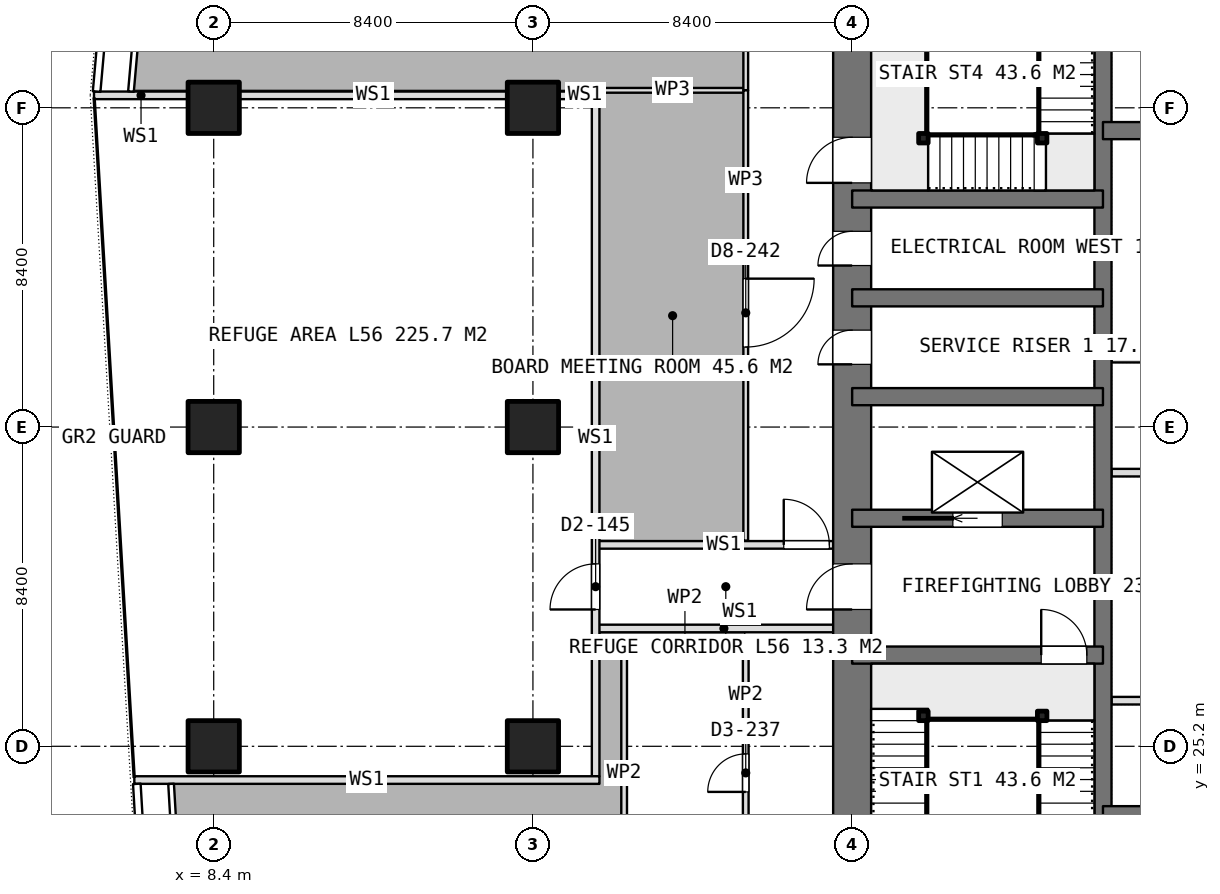
"""IFC4 building model, lengths in metres.
Left out: names, types, materials, properties, quantities, classifications, styles, units other than length and angle.
Written with IfcOpenShell. Run it as: python <this file> out.ifc"""

import sys

from ifc_helpers import new_model, si_unit, direction, frame, frame_2d, origin, origin_2d, place, context, subcontext, project, spatial, rectangle, extrude, element, fill, save


model = new_model("IFC4")
c1 = context("Model", 3, precision=1e-05, world=origin(), true_north=direction((0.0, 1.0)))
c2 = subcontext(c1, "Body", "Model", "MODEL_VIEW")
j1 = project(units=[si_unit("LENGTHUNIT", "METRE"), si_unit("PLANEANGLEUNIT", "RADIAN")], contexts=[c1])
p1 = place(None, origin())
s1 = spatial("IfcSite", under=j1, at=p1, CompositionType="ELEMENT")
p2 = place(p1, origin())
s2 = spatial("IfcBuilding", under=s1, at=p2, CompositionType="ELEMENT")
p3 = place(p2, frame((0.0, 0.0, 221.45)))
s3 = spatial("IfcBuildingStorey", under=s2, at=p3, CompositionType="ELEMENT", Elevation=221.45)
p4 = place(p3, frame((25.2, 21.0, 0.0), z_axis=(0.0, 0.0, 1.0), x_axis=(0.0, 1.0, 0.0)))
e1 = element("IfcWall", 1, at=p4, inside=s3, PredefinedType="SHEAR", context=c2, shape_type="SweptSolid", body=[
    extrude(rectangle(XDim=25.2, YDim=1.0, at=frame_2d((12.6, 0.0))), origin(), (0.0, 0.0, 1.0), 3.75),
])
p5 = place(p4, frame((7.8, 0.0, 0.0)))
e2 = element("IfcOpeningElement", 2, at=p5, cuts=e1, PredefinedType="OPENING", context=c2, shape_type="SweptSolid", body=[
    extrude(rectangle(XDim=1.2, YDim=2.1, at=frame_2d((0.6, 1.05))), frame((0.0, 0.51, 0.0), z_axis=(0.0, -1.0, 0.0), x_axis=(1.0, 0.0, 0.0)), (0.0, 0.0, 1.0), 1.02),
])
p6 = place(p4, frame((14.25, 0.0, 0.0)))
e3 = element("IfcOpeningElement", 3, at=p6, cuts=e1, PredefinedType="OPENING", context=c2, shape_type="SweptSolid", body=[
    extrude(rectangle(XDim=0.9, YDim=2.1, at=frame_2d((0.45, 1.05))), frame((0.0, 0.51, 0.0), z_axis=(0.0, -1.0, 0.0), x_axis=(1.0, 0.0, 0.0)), (0.0, 0.0, 1.0), 1.02),
])
p7 = place(p4, frame((16.85, 0.0, 0.0)))
e4 = element("IfcOpeningElement", 4, at=p7, cuts=e1, PredefinedType="OPENING", context=c2, shape_type="SweptSolid", body=[
    extrude(rectangle(XDim=0.9, YDim=2.1, at=frame_2d((0.45, 1.05))), frame((0.0, 0.51, 0.0), z_axis=(0.0, -1.0, 0.0), x_axis=(1.0, 0.0, 0.0)), (0.0, 0.0, 1.0), 1.02),
])
p8 = place(p4, frame((19.025, 0.0, 0.0)))
e5 = element("IfcOpeningElement", 5, at=p8, cuts=e1, PredefinedType="OPENING", context=c2, shape_type="SweptSolid", body=[
    extrude(rectangle(XDim=1.2, YDim=2.1, at=frame_2d((0.6, 1.05))), frame((0.0, 0.51, 0.0), z_axis=(0.0, -1.0, 0.0), x_axis=(1.0, 0.0, 0.0)), (0.0, 0.0, 1.0), 1.02),
])
p9 = place(p3, frame((31.8, 21.0, 0.0), z_axis=(0.0, 0.0, 1.0), x_axis=(0.0, 1.0, 0.0)))
e6 = element("IfcWall", 6, at=p9, inside=s3, PredefinedType="SHEAR", context=c2, shape_type="SweptSolid", body=[
    extrude(rectangle(XDim=25.2, YDim=0.45, at=frame_2d((12.6, 0.0))), origin(), (0.0, 0.0, 1.0), 3.75),
])
for number, where, z_axis, x_axis in (
    (7, (31.8, 23.4, 0.0), (0.0, 0.0, 1.0), (1.0, 0.0, 0.0)),
    (8, (31.8, 41.4, 0.0), (0.0, 0.0, 1.0), (1.0, 0.0, 0.0)),
):
    element("IfcWall", number, at=place(p3, frame(where, z_axis=z_axis, x_axis=x_axis)), inside=s3, PredefinedType="SHEAR", context=c2, shape_type="SweptSolid", body=[
        extrude(rectangle(XDim=3.8, YDim=0.45, at=frame_2d((1.9, 0.0))), origin(), (0.0, 0.0, 1.0), 3.75),
    ])
p10 = place(p3, frame((25.2, 27.6, 0.0), z_axis=(0.0, 0.0, 1.0), x_axis=(1.0, 0.0, 0.0)))
e9 = element("IfcWall", 9, at=p10, inside=s3, PredefinedType="SHEAR", context=c2, shape_type="SweptSolid", body=[
    extrude(rectangle(XDim=6.6, YDim=0.45, at=frame_2d((3.3, 0.0))), origin(), (0.0, 0.0, 1.0), 3.75),
])
p11 = place(p10, frame((4.975, 0.0, 0.0)))
e10 = element("IfcOpeningElement", 10, at=p11, cuts=e9, PredefinedType="OPENING", context=c2, shape_type="SweptSolid", body=[
    extrude(rectangle(XDim=1.2, YDim=2.1, at=frame_2d((0.6, 1.05))), frame((0.0, 0.235, 0.0), z_axis=(0.0, -1.0, 0.0), x_axis=(1.0, 0.0, 0.0)), (0.0, 0.0, 1.0), 0.47),
])
p12 = place(p3, frame((25.2, 31.2, 0.0), z_axis=(0.0, 0.0, 1.0), x_axis=(1.0, 0.0, 0.0)))
e11 = element("IfcWall", 11, at=p12, inside=s3, PredefinedType="SHEAR", context=c2, shape_type="SweptSolid", body=[
    extrude(rectangle(XDim=6.6, YDim=0.45, at=frame_2d((3.3, 0.0))), origin(), (0.0, 0.0, 1.0), 3.75),
])
p13 = place(p12, frame((2.65, 0.0, 0.0)))
e12 = element("IfcOpeningElement", 12, at=p13, cuts=e11, PredefinedType="OPENING", context=c2, shape_type="SweptSolid", body=[
    extrude(rectangle(XDim=1.3, YDim=2.1, at=frame_2d((0.65, 1.05))), frame((0.0, 0.235, 0.0), z_axis=(0.0, -1.0, 0.0), x_axis=(1.0, 0.0, 0.0)), (0.0, 0.0, 1.0), 0.47),
])
for number, where, z_axis, x_axis in (
    (13, (25.2, 34.4, 0.0), (0.0, 0.0, 1.0), (1.0, 0.0, 0.0)),
    (14, (25.2, 37.0, 0.0), (0.0, 0.0, 1.0), (1.0, 0.0, 0.0)),
    (15, (25.2, 39.6, 0.0), (0.0, 0.0, 1.0), (1.0, 0.0, 0.0)),
):
    element("IfcWall", number, at=place(p3, frame(where, z_axis=z_axis, x_axis=x_axis)), inside=s3, PredefinedType="SHEAR", context=c2, shape_type="SweptSolid", body=[
        extrude(rectangle(XDim=6.6, YDim=0.45, at=frame_2d((3.3, 0.0))), origin(), (0.0, 0.0, 1.0), 3.75),
    ])
for number, where, z_axis, x_axis in (
    (16, (8.4, 25.2, 0.0), (0.0, 0.0, 1.0), (1.0, 0.0, 0.0)),
    (17, (8.4, 33.6, 0.0), (0.0, 0.0, 1.0), (1.0, 0.0, 0.0)),
    (18, (8.4, 42.0, 0.0), (0.0, 0.0, 1.0), (1.0, 0.0, 0.0)),
    (19, (16.8, 25.2, 0.0), (0.0, 0.0, 1.0), (1.0, 0.0, 0.0)),
    (20, (16.8, 33.6, 0.0), (0.0, 0.0, 1.0), (1.0, 0.0, 0.0)),
    (21, (16.8, 42.0, 0.0), (0.0, 0.0, 1.0), (1.0, 0.0, 0.0)),
):
    element("IfcColumn", number, at=place(p3, frame(where, z_axis=z_axis, x_axis=x_axis)), inside=s3, PredefinedType="COLUMN", context=c2, shape_type="SweptSolid", body=[
        extrude(rectangle(XDim=1.35, YDim=1.35, at=origin_2d()), origin(), (0.0, 0.0, 1.0), 3.75),
    ])
for number, where, z_axis, x_axis in (
    (22, (32.025, 26.4, 0.0), (0.0, 0.0, 1.0), (1.0, 0.0, 0.0)),
    (23, (32.025, 29.4, 0.0), (0.0, 0.0, 1.0), (1.0, 0.0, 0.0)),
    (24, (32.025, 32.4, 0.0), (0.0, 0.0, 1.0), (1.0, 0.0, 0.0)),
    (25, (32.025, 35.4, 0.0), (0.0, 0.0, 1.0), (1.0, 0.0, 0.0)),
    (26, (32.025, 38.4, 0.0), (0.0, 0.0, 1.0), (1.0, 0.0, 0.0)),
):
    element("IfcWall", number, at=place(p3, frame(where, z_axis=z_axis, x_axis=x_axis)), inside=s3, PredefinedType="PARTITIONING", context=c2, shape_type="SweptSolid", body=[
        extrude(rectangle(XDim=3.35, YDim=0.2, at=frame_2d((1.675, 0.0))), origin(), (0.0, 0.0, 1.0), 3.5),
    ])
p14 = place(p3, frame((19.125, 28.0, 0.0), z_axis=(0.0, 0.0, 1.0), x_axis=(1.0, 0.0, 0.0)))
e27 = element("IfcWall", 27, at=p14, inside=s3, PredefinedType="PARTITIONING", context=c2, shape_type="SweptSolid", body=[
    extrude(rectangle(XDim=3.35, YDim=0.15, at=frame_2d((1.675, 0.0))), origin(), (0.0, 0.0, 1.0), 3.5),
])
p15 = place(p3, frame((19.2, 21.075, 0.0), z_axis=(0.0, 0.0, 1.0), x_axis=(0.0, 1.0, 0.0)))
e28 = element("IfcWall", 28, at=p15, inside=s3, PredefinedType="PARTITIONING", context=c2, shape_type="SweptSolid", body=[
    extrude(rectangle(XDim=6.85, YDim=0.15, at=frame_2d((3.425, 0.0))), origin(), (0.0, 0.0, 1.0), 3.5),
])
p16 = place(p3, frame((22.4, 21.075, 0.0), z_axis=(0.0, 0.0, 1.0), x_axis=(0.0, 1.0, 0.0)))
e29 = element("IfcWall", 29, at=p16, inside=s3, PredefinedType="PARTITIONING", context=c2, shape_type="SweptSolid", body=[
    extrude(rectangle(XDim=6.85, YDim=0.15, at=frame_2d((3.425, 0.0))), origin(), (0.0, 0.0, 1.0), 3.5),
])
p17 = place(p16, frame((2.925, 0.0, 0.0)))
e30 = element("IfcOpeningElement", 30, at=p17, cuts=e29, PredefinedType="OPENING", context=c2, shape_type="SweptSolid", body=[
    extrude(rectangle(XDim=1.0, YDim=2.1, at=frame_2d((0.5, 1.05))), frame((0.0, 0.085, 0.0), z_axis=(0.0, -1.0, 0.0), x_axis=(1.0, 0.0, 0.0)), (0.0, 0.0, 1.0), 0.17),
])
p18 = place(p3, frame((22.4, 42.46, 0.0), z_axis=(0.0, 0.0, 1.0), x_axis=(-1.0, 0.0, 0.0)))
e31 = element("IfcWall", 31, at=p18, inside=s3, PredefinedType="PARTITIONING", context=c2, shape_type="SweptSolid", body=[
    extrude(rectangle(XDim=3.849, YDim=0.125, at=frame_2d((1.924, 0.0))), origin(), (0.0, 0.0, 1.0), 3.5),
])
p19 = place(p3, frame((22.4, 48.729, 0.0), z_axis=(0.0, 0.0, 1.0), x_axis=(0.0, -1.0, 0.0)))
e32 = element("IfcWall", 32, at=p19, inside=s3, PredefinedType="PARTITIONING", context=c2, shape_type="SweptSolid", body=[
    extrude(rectangle(XDim=6.269, YDim=0.125, at=frame_2d((3.135, 0.0))), origin(), (0.0, 0.0, 1.0), 3.5),
])
p20 = place(p19, frame((2.235, 0.0, 0.0)))
e33 = element("IfcOpeningElement", 33, at=p20, cuts=e32, PredefinedType="OPENING", context=c2, shape_type="SweptSolid", body=[
    extrude(rectangle(XDim=1.8, YDim=2.1, at=frame_2d((0.9, 1.05))), frame((0.0, 0.073, 0.0), z_axis=(0.0, -1.0, 0.0), x_axis=(1.0, 0.0, 0.0)), (0.0, 0.0, 1.0), 0.145),
])
p21 = place(p3, frame((22.4, 42.46, 0.0), z_axis=(0.0, 0.0, 1.0), x_axis=(0.0, -1.0, 0.0)))
e34 = element("IfcWall", 34, at=p21, inside=s3, PredefinedType="PARTITIONING", context=c2, shape_type="SweptSolid", body=[
    extrude(rectangle(XDim=11.849, YDim=0.125, at=frame_2d((5.924, 0.0))), origin(), (0.0, 0.0, 1.0), 3.5),
])
p22 = place(p21, frame((4.955, 0.0, 0.0)))
e35 = element("IfcOpeningElement", 35, at=p22, cuts=e34, PredefinedType="OPENING", context=c2, shape_type="SweptSolid", body=[
    extrude(rectangle(XDim=1.8, YDim=2.1, at=frame_2d((0.9, 1.05))), frame((0.0, 0.073, 0.0), z_axis=(0.0, -1.0, 0.0), x_axis=(1.0, 0.0, 0.0)), (0.0, 0.0, 1.0), 0.145),
])
for number, where, z_axis, x_axis in (
    (36, (30.2, 26.0, 0.0), (0.0, 0.0, 1.0), (1.0, 0.0, 0.0)),
    (37, (27.075, 26.0, 0.0), (0.0, 0.0, 1.0), (1.0, 0.0, 0.0)),
    (38, (27.075, 41.2, 0.0), (0.0, 0.0, 1.0), (1.0, 0.0, 0.0)),
    (39, (30.2, 41.2, 0.0), (0.0, 0.0, 1.0), (1.0, 0.0, 0.0)),
):
    element("IfcColumn", number, at=place(p3, frame(where, z_axis=z_axis, x_axis=x_axis)), inside=s3, PredefinedType="COLUMN", context=c2, shape_type="SweptSolid", body=[
        extrude(rectangle(XDim=0.25, YDim=0.25, at=origin_2d()), origin(), (0.0, 0.0, 1.0), 3.75),
    ])
p23 = place(p3, frame((18.45, 24.412, 0.0), z_axis=(0.0, 0.0, 1.0), x_axis=(0.0, 1.0, 0.0)))
e40 = element("IfcWall", 40, at=p23, inside=s3, PredefinedType="PARTITIONING", context=c2, shape_type="SweptSolid", body=[
    extrude(rectangle(XDim=17.816, YDim=0.2, at=frame_2d((8.908, 0.0))), origin(), (0.0, 0.0, 1.0), 3.5),
])
p24 = place(p23, frame((4.388, 0.0, 0.0)))
e41 = element("IfcOpeningElement", 41, at=p24, cuts=e40, PredefinedType="OPENING", context=c2, shape_type="SweptSolid", body=[
    extrude(rectangle(XDim=1.2, YDim=2.1, at=frame_2d((0.6, 1.05))), frame((0.0, 0.11, 0.0), z_axis=(0.0, -1.0, 0.0), x_axis=(1.0, 0.0, 0.0)), (0.0, 0.0, 1.0), 0.22),
])
p25 = place(p3, frame((6.311, 24.312, 0.0), z_axis=(0.0, 0.0, 1.0), x_axis=(1.0, 0.0, 0.0)))
e42 = element("IfcWall", 42, at=p25, inside=s3, PredefinedType="PARTITIONING", context=c2, shape_type="SweptSolid", body=[
    extrude(rectangle(XDim=12.239, YDim=0.2, at=frame_2d((6.12, 0.0))), origin(), (0.0, 0.0, 1.0), 3.5),
])
p26 = place(p3, frame((5.25, 42.328, 0.0), z_axis=(0.0, 0.0, 1.0), x_axis=(1.0, 0.0, 0.0)))
e43 = element("IfcWall", 43, at=p26, inside=s3, PredefinedType="PARTITIONING", context=c2, shape_type="SweptSolid", body=[
    extrude(rectangle(XDim=2.475, YDim=0.2, at=frame_2d((1.238, 0.0))), origin(), (0.0, 0.0, 1.0), 3.5),
])
p27 = place(p3, frame((9.075, 42.328, 0.0), z_axis=(0.0, 0.0, 1.0), x_axis=(1.0, 0.0, 0.0)))
e44 = element("IfcWall", 44, at=p27, inside=s3, PredefinedType="PARTITIONING", context=c2, shape_type="SweptSolid", body=[
    extrude(rectangle(XDim=7.05, YDim=0.2, at=frame_2d((3.525, 0.0))), origin(), (0.0, 0.0, 1.0), 3.5),
])
p28 = place(p3, frame((17.475, 42.328, 0.0), z_axis=(0.0, 0.0, 1.0), x_axis=(1.0, 0.0, 0.0)))
e45 = element("IfcWall", 45, at=p28, inside=s3, PredefinedType="PARTITIONING", context=c2, shape_type="SweptSolid", body=[
    extrude(rectangle(XDim=1.075, YDim=0.2, at=frame_2d((0.538, 0.0))), origin(), (0.0, 0.0, 1.0), 3.5),
])
p29 = place(p3, frame((18.45, 30.5, 0.0), z_axis=(0.0, 0.0, 1.0), x_axis=(1.0, 0.0, 0.0)))
e46 = element("IfcWall", 46, at=p29, inside=s3, PredefinedType="PARTITIONING", context=c2, shape_type="SweptSolid", body=[
    extrude(rectangle(XDim=6.75, YDim=0.2, at=frame_2d((3.375, 0.0))), origin(), (0.0, 0.0, 1.0), 3.5),
])
p30 = place(p29, frame((4.95, 0.0, 0.0)))
e47 = element("IfcOpeningElement", 47, at=p30, cuts=e46, PredefinedType="OPENING", context=c2, shape_type="SweptSolid", body=[
    extrude(rectangle(XDim=1.2, YDim=2.1, at=frame_2d((0.6, 1.05))), frame((0.0, 0.11, 0.0), z_axis=(0.0, -1.0, 0.0), x_axis=(1.0, 0.0, 0.0)), (0.0, 0.0, 1.0), 0.22),
])
p31 = place(p3, frame((18.45, 28.3, 0.0), z_axis=(0.0, 0.0, 1.0), x_axis=(1.0, 0.0, 0.0)))
e48 = element("IfcWall", 48, at=p31, inside=s3, PredefinedType="PARTITIONING", context=c2, shape_type="SweptSolid", body=[
    extrude(rectangle(XDim=6.75, YDim=0.2, at=frame_2d((3.375, 0.0))), origin(), (0.0, 0.0, 1.0), 3.5),
])
p32 = place(p5, origin())
e49 = element("IfcDoor", 49, at=p32, inside=s3, OperationType="SINGLE_SWING_LEFT", PredefinedType="DOOR", context=c2, shape_type="SweptSolid", body=[
    extrude(rectangle(XDim=1.2, YDim=2.1, at=frame_2d((0.6, 1.05))), frame((0.0, 0.025, 0.0), z_axis=(0.0, -1.0, 0.0), x_axis=(1.0, 0.0, 0.0)), (0.0, 0.0, 1.0), 0.05),
])
fill(e2, e49)
p33 = place(p6, origin())
e50 = element("IfcDoor", 50, at=p33, inside=s3, OperationType="SINGLE_SWING_LEFT", PredefinedType="DOOR", context=c2, shape_type="SweptSolid", body=[
    extrude(rectangle(XDim=0.9, YDim=2.1, at=frame_2d((0.45, 1.05))), frame((0.0, 0.025, 0.0), z_axis=(0.0, -1.0, 0.0), x_axis=(1.0, 0.0, 0.0)), (0.0, 0.0, 1.0), 0.05),
])
fill(e3, e50)
p34 = place(p7, origin())
e51 = element("IfcDoor", 51, at=p34, inside=s3, OperationType="SINGLE_SWING_LEFT", PredefinedType="DOOR", context=c2, shape_type="SweptSolid", body=[
    extrude(rectangle(XDim=0.9, YDim=2.1, at=frame_2d((0.45, 1.05))), frame((0.0, 0.025, 0.0), z_axis=(0.0, -1.0, 0.0), x_axis=(1.0, 0.0, 0.0)), (0.0, 0.0, 1.0), 0.05),
])
fill(e4, e51)
p35 = place(p13, origin())
e52 = element("IfcDoor", 52, at=p35, inside=s3, OperationType="SLIDING_TO_LEFT", PredefinedType="USERDEFINED", context=c2, shape_type="SweptSolid", body=[
    extrude(rectangle(XDim=1.3, YDim=2.1, at=frame_2d((0.65, 1.05))), frame((0.0, 0.025, 0.0), z_axis=(0.0, -1.0, 0.0), x_axis=(1.0, 0.0, 0.0)), (0.0, 0.0, 1.0), 0.05),
])
fill(e12, e52)
p36 = place(p17, origin())
e53 = element("IfcDoor", 53, at=p36, inside=s3, OperationType="SINGLE_SWING_LEFT", PredefinedType="DOOR", context=c2, shape_type="SweptSolid", body=[
    extrude(rectangle(XDim=1.0, YDim=2.1, at=frame_2d((0.5, 1.05))), frame((0.0, 0.025, 0.0), z_axis=(0.0, -1.0, 0.0), x_axis=(1.0, 0.0, 0.0)), (0.0, 0.0, 1.0), 0.05),
])
fill(e30, e53)
p37 = place(p22, origin())
e54 = element("IfcDoor", 54, at=p37, inside=s3, OperationType="DOUBLE_DOOR_SINGLE_SWING", PredefinedType="DOOR", context=c2, shape_type="SweptSolid", body=[
    extrude(rectangle(XDim=1.8, YDim=2.1, at=frame_2d((0.9, 1.05))), frame((0.0, 0.025, 0.0), z_axis=(0.0, -1.0, 0.0), x_axis=(1.0, 0.0, 0.0)), (0.0, 0.0, 1.0), 0.05),
])
fill(e35, e54)
p38 = place(p11, origin())
e55 = element("IfcDoor", 55, at=p38, inside=s3, OperationType="SINGLE_SWING_RIGHT", PredefinedType="DOOR", context=c2, shape_type="SweptSolid", body=[
    extrude(rectangle(XDim=1.2, YDim=2.1, at=frame_2d((0.6, 1.05))), frame((0.0, 0.025, 0.0), z_axis=(0.0, -1.0, 0.0), x_axis=(1.0, 0.0, 0.0)), (0.0, 0.0, 1.0), 0.05),
])
fill(e10, e55)
p39 = place(p8, origin())
e56 = element("IfcDoor", 56, at=p39, inside=s3, OperationType="SINGLE_SWING_RIGHT", PredefinedType="DOOR", context=c2, shape_type="SweptSolid", body=[
    extrude(rectangle(XDim=1.2, YDim=2.1, at=frame_2d((0.6, 1.05))), frame((0.0, 0.025, 0.0), z_axis=(0.0, -1.0, 0.0), x_axis=(1.0, 0.0, 0.0)), (0.0, 0.0, 1.0), 0.05),
])
fill(e5, e56)
p40 = place(p24, origin())
e57 = element("IfcDoor", 57, at=p40, inside=s3, OperationType="SINGLE_SWING_LEFT", PredefinedType="DOOR", context=c2, shape_type="SweptSolid", body=[
    extrude(rectangle(XDim=1.2, YDim=2.1, at=frame_2d((0.6, 1.05))), frame((0.0, 0.025, 0.0), z_axis=(0.0, -1.0, 0.0), x_axis=(1.0, 0.0, 0.0)), (0.0, 0.0, 1.0), 0.05),
])
fill(e41, e57)
p41 = place(p30, origin())
e58 = element("IfcDoor", 58, at=p41, inside=s3, OperationType="SINGLE_SWING_LEFT", PredefinedType="DOOR", context=c2, shape_type="SweptSolid", body=[
    extrude(rectangle(XDim=1.2, YDim=2.1, at=frame_2d((0.6, 1.05))), frame((0.0, 0.025, 0.0), z_axis=(0.0, -1.0, 0.0), x_axis=(1.0, 0.0, 0.0)), (0.0, 0.0, 1.0), 0.05),
])
fill(e47, e58)
save(model, sys.argv[1])
